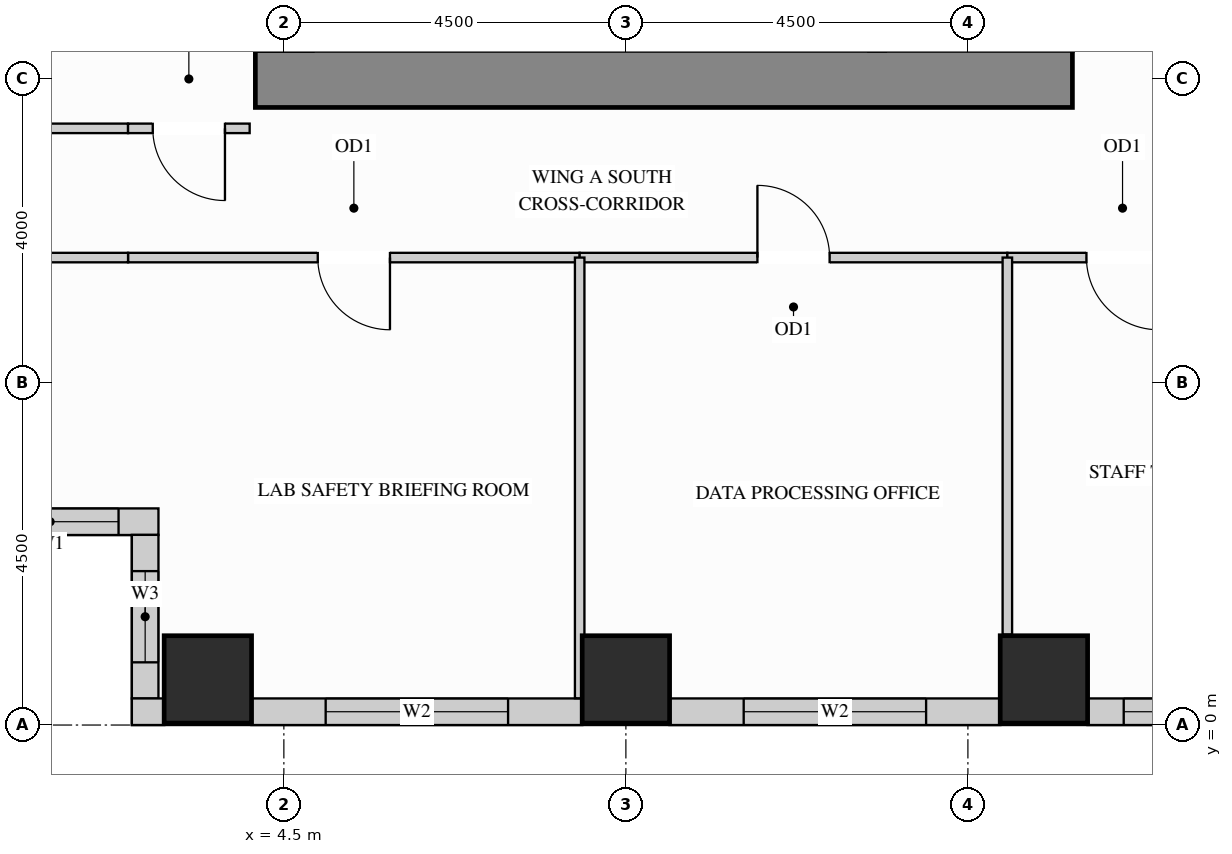
"""IFC4 building model, lengths in metres.
Left out: names, types, materials, properties, quantities, classifications, styles, units other than length and angle.
Written with IfcOpenShell. Run it as: python <this file> out.ifc"""

import sys

from ifc_helpers import new_model, si_unit, direction, frame, frame_2d, origin, origin_2d, place, context, subcontext, project, spatial, rectangle, extrude, source, transform, mapped, element, fill, save


model = new_model("IFC4")
c1 = context("Model", 3, precision=1e-05, world=origin(), true_north=direction((0.0, 1.0)))
c2 = subcontext(c1, "Body", "Model", "MODEL_VIEW")
j1 = project(units=[si_unit("LENGTHUNIT", "METRE"), si_unit("PLANEANGLEUNIT", "RADIAN")], contexts=[c1])
p1 = place(None, origin())
s1 = spatial("IfcSite", under=j1, at=p1, CompositionType="ELEMENT")
p2 = place(p1, origin())
s2 = spatial("IfcBuilding", under=s1, at=p2, CompositionType="ELEMENT")
p3 = place(p2, frame((0.0, 0.0, 120.6)))
s3 = spatial("IfcBuildingStorey", under=s2, at=p3, CompositionType="ELEMENT", Elevation=120.6)
m1 = source(origin(), c2, "Body", "SweptSolid", [
    extrude(rectangle(XDim=1.15, YDim=1.15, at=origin_2d()), origin(), (0.0, 0.0, 1.0), 3.38),
])
for number, where, z_axis, x_axis in (
    (1, (14.5, 0.6, 0.0), (0.0, 0.0, 1.0), (1.0, 0.0, 0.0)),
    (2, (3.5, 0.6, 0.0), (0.0, 0.0, 1.0), (1.0, 0.0, 0.0)),
    (3, (9.0, 0.6, 0.0), (0.0, 0.0, 1.0), (1.0, 0.0, 0.0)),
):
    element("IfcColumn", number, at=place(p3, frame(where, z_axis=z_axis, x_axis=x_axis)), inside=s3, PredefinedType="COLUMN", context=c2, shape_type="MappedRepresentation", body=[
        mapped(m1, transform((0.0, 0.0, 0.0), x_axis=(1.0, 0.0, 0.0), y_axis=(0.0, 1.0, 0.0), z_axis=(0.0, 0.0, 1.0))),
    ])
m2 = source(origin(), c2, "Body", "SweptSolid", [
    extrude(rectangle(XDim=10.75, YDim=0.75, at=frame_2d((5.375, 0.0))), origin(), (0.0, 0.0, 1.0), 3.38),
])
p4 = place(p3, frame((4.125, 8.5, 0.0), z_axis=(0.0, 0.0, 1.0), x_axis=(1.0, 0.0, 0.0)))
e4 = element("IfcWall", 4, at=p4, inside=s3, PredefinedType="SHEAR", context=c2, shape_type="MappedRepresentation", body=[
    mapped(m2, transform((0.0, 0.0, 0.0), x_axis=(1.0, 0.0, 0.0), y_axis=(0.0, 1.0, 0.0), z_axis=(0.0, 0.0, 1.0))),
])
p5 = place(p3, frame((0.0, 2.675, 0.0), z_axis=(0.0, 0.0, 1.0), x_axis=(1.0, 0.0, 0.0)))
e5 = element("IfcWall", 5, at=p5, inside=s3, PredefinedType="SOLIDWALL", context=c2, shape_type="SweptSolid", body=[
    extrude(rectangle(XDim=2.85, YDim=0.35, at=frame_2d((1.425, 0.0))), origin(), (0.0, 0.0, 1.0), 3.365),
])
p6 = place(p5, frame((0.525, 0.0, 0.78)))
e6 = element("IfcOpeningElement", 6, at=p6, cuts=e5, PredefinedType="OPENING", context=c2, shape_type="SweptSolid", body=[
    extrude(rectangle(XDim=1.8, YDim=2.1, at=frame_2d((0.9, 1.05))), frame((0.0, 0.185, 0.0), z_axis=(0.0, -1.0, 0.0), x_axis=(1.0, 0.0, 0.0)), (0.0, 0.0, 1.0), 0.37),
])
p7 = place(p3, frame((2.675, 2.502, 0.0), z_axis=(0.0, 0.0, 1.0), x_axis=(0.0, -1.0, 0.0)))
e7 = element("IfcWall", 7, at=p7, inside=s3, PredefinedType="SOLIDWALL", context=c2, shape_type="SweptSolid", body=[
    extrude(rectangle(XDim=2.154, YDim=0.35, at=frame_2d((1.077, 0.0))), origin(), (0.0, 0.0, 1.0), 3.365),
])
p8 = place(p7, frame((0.477, 0.0, 0.78)))
e8 = element("IfcOpeningElement", 8, at=p8, cuts=e7, PredefinedType="OPENING", context=c2, shape_type="SweptSolid", body=[
    extrude(rectangle(XDim=1.2, YDim=2.1, at=frame_2d((0.6, 1.05))), frame((0.0, 0.185, 0.0), z_axis=(0.0, -1.0, 0.0), x_axis=(1.0, 0.0, 0.0)), (0.0, 0.0, 1.0), 0.37),
])
m3 = source(origin(), c2, "Body", "SweptSolid", [
    extrude(rectangle(XDim=0.427, YDim=0.35, at=frame_2d((0.213, 0.0))), origin(), (0.0, 0.0, 1.0), 3.365),
])
p9 = place(p3, frame((2.5, 0.175, 0.0), z_axis=(0.0, 0.0, 1.0), x_axis=(1.0, 0.0, 0.0)))
e9 = element("IfcWall", 9, at=p9, inside=s3, PredefinedType="SOLIDWALL", context=c2, shape_type="MappedRepresentation", body=[
    mapped(m3, transform((0.0, 0.0, 0.0), x_axis=(1.0, 0.0, 0.0), y_axis=(0.0, 1.0, 0.0), z_axis=(0.0, 0.0, 1.0))),
])
p10 = place(p3, frame((4.073, 0.175, 0.0), z_axis=(0.0, 0.0, 1.0), x_axis=(1.0, 0.0, 0.0)))
e10 = element("IfcWall", 10, at=p10, inside=s3, PredefinedType="SOLIDWALL", context=c2, shape_type="SweptSolid", body=[
    extrude(rectangle(XDim=4.354, YDim=0.35, at=frame_2d((2.177, 0.0))), origin(), (0.0, 0.0, 1.0), 3.365),
])
p11 = place(p10, frame((0.977, 0.0, 0.78)))
e11 = element("IfcOpeningElement", 11, at=p11, cuts=e10, PredefinedType="OPENING", context=c2, shape_type="SweptSolid", body=[
    extrude(rectangle(XDim=2.4, YDim=2.1, at=frame_2d((1.2, 1.05))), frame((0.0, 0.185, 0.0), z_axis=(0.0, -1.0, 0.0), x_axis=(1.0, 0.0, 0.0)), (0.0, 0.0, 1.0), 0.37),
])
p12 = place(p3, frame((9.573, 0.175, 0.0), z_axis=(0.0, 0.0, 1.0), x_axis=(1.0, 0.0, 0.0)))
e12 = element("IfcWall", 12, at=p12, inside=s3, PredefinedType="SOLIDWALL", context=c2, shape_type="SweptSolid", body=[
    extrude(rectangle(XDim=4.354, YDim=0.35, at=frame_2d((2.177, 0.0))), origin(), (0.0, 0.0, 1.0), 3.365),
])
p13 = place(p12, frame((0.977, 0.0, 0.78)))
e13 = element("IfcOpeningElement", 13, at=p13, cuts=e12, PredefinedType="OPENING", context=c2, shape_type="SweptSolid", body=[
    extrude(rectangle(XDim=2.4, YDim=2.1, at=frame_2d((1.2, 1.05))), frame((0.0, 0.185, 0.0), z_axis=(0.0, -1.0, 0.0), x_axis=(1.0, 0.0, 0.0)), (0.0, 0.0, 1.0), 0.37),
])
p14 = place(p3, frame((15.073, 0.175, 0.0), z_axis=(0.0, 0.0, 1.0), x_axis=(1.0, 0.0, 0.0)))
e14 = element("IfcWall", 14, at=p14, inside=s3, PredefinedType="SOLIDWALL", context=c2, shape_type="SweptSolid", body=[
    extrude(rectangle(XDim=3.354, YDim=0.35, at=frame_2d((1.677, 0.0))), origin(), (0.0, 0.0, 1.0), 3.365),
])
p15 = place(p14, frame((0.477, 0.0, 0.78)))
e15 = element("IfcOpeningElement", 15, at=p15, cuts=e14, PredefinedType="OPENING", context=c2, shape_type="SweptSolid", body=[
    extrude(rectangle(XDim=2.4, YDim=2.1, at=frame_2d((1.2, 1.05))), frame((0.0, 0.185, 0.0), z_axis=(0.0, -1.0, 0.0), x_axis=(1.0, 0.0, 0.0)), (0.0, 0.0, 1.0), 0.37),
])
m4 = source(origin(), c2, "Body", "SweptSolid", [
    extrude(rectangle(XDim=2.098, YDim=0.125, at=frame_2d((1.049, 0.0))), origin(), (0.0, 0.0, 1.0), 3.365),
])
p16 = place(p3, frame((0.352, 7.85, 0.0), z_axis=(0.0, 0.0, 1.0), x_axis=(1.0, 0.0, 0.0)))
e16 = element("IfcWall", 16, at=p16, inside=s3, PredefinedType="PARTITIONING", context=c2, shape_type="MappedRepresentation", body=[
    mapped(m4, transform((0.0, 0.0, 0.0), x_axis=(1.0, 0.0, 0.0), y_axis=(0.0, 1.0, 0.0), z_axis=(0.0, 0.0, 1.0))),
])
p17 = place(p3, frame((2.45, 7.85, 0.0), z_axis=(0.0, 0.0, 1.0), x_axis=(1.0, 0.0, 0.0)))
e17 = element("IfcWall", 17, at=p17, inside=s3, PredefinedType="PARTITIONING", context=c2, shape_type="SweptSolid", body=[
    extrude(rectangle(XDim=1.6, YDim=0.125, at=frame_2d((0.8, 0.0))), origin(), (0.0, 0.0, 1.0), 3.365),
])
p18 = place(p17, frame((0.325, 0.0, 0.0)))
e18 = element("IfcOpeningElement", 18, at=p18, cuts=e17, PredefinedType="OPENING", context=c2, shape_type="SweptSolid", body=[
    extrude(rectangle(XDim=0.95, YDim=2.15, at=frame_2d((0.475, 1.075))), frame((0.0, 0.073, 0.0), z_axis=(0.0, -1.0, 0.0), x_axis=(1.0, 0.0, 0.0)), (0.0, 0.0, 1.0), 0.145),
])
p19 = place(p3, frame((2.45, 6.15, 0.0), z_axis=(0.0, 0.0, 1.0), x_axis=(1.0, 0.0, 0.0)))
e19 = element("IfcWall", 19, at=p19, inside=s3, PredefinedType="PARTITIONING", context=c2, shape_type="SweptSolid", body=[
    extrude(rectangle(XDim=5.942, YDim=0.125, at=frame_2d((2.971, 0.0))), origin(), (0.0, 0.0, 1.0), 3.365),
])
p20 = place(p19, frame((2.496, 0.0, 0.0)))
e20 = element("IfcOpeningElement", 20, at=p20, cuts=e19, PredefinedType="OPENING", context=c2, shape_type="SweptSolid", body=[
    extrude(rectangle(XDim=0.95, YDim=2.15, at=frame_2d((0.475, 1.075))), frame((0.0, 0.073, 0.0), z_axis=(0.0, -1.0, 0.0), x_axis=(1.0, 0.0, 0.0)), (0.0, 0.0, 1.0), 0.145),
])
p21 = place(p3, frame((8.392, 6.15, 0.0), z_axis=(0.0, 0.0, 1.0), x_axis=(1.0, 0.0, 0.0)))
e21 = element("IfcWall", 21, at=p21, inside=s3, PredefinedType="PARTITIONING", context=c2, shape_type="SweptSolid", body=[
    extrude(rectangle(XDim=5.627, YDim=0.125, at=frame_2d((2.813, 0.0))), origin(), (0.0, 0.0, 1.0), 3.365),
])
p22 = place(p21, frame((2.338, 0.0, 0.0)))
e22 = element("IfcOpeningElement", 22, at=p22, cuts=e21, PredefinedType="OPENING", context=c2, shape_type="SweptSolid", body=[
    extrude(rectangle(XDim=0.95, YDim=2.15, at=frame_2d((0.475, 1.075))), frame((0.0, 0.073, 0.0), z_axis=(0.0, -1.0, 0.0), x_axis=(1.0, 0.0, 0.0)), (0.0, 0.0, 1.0), 0.145),
])
p23 = place(p3, frame((14.019, 6.15, 0.0), z_axis=(0.0, 0.0, 1.0), x_axis=(1.0, 0.0, 0.0)))
e23 = element("IfcWall", 23, at=p23, inside=s3, PredefinedType="PARTITIONING", context=c2, shape_type="SweptSolid", body=[
    extrude(rectangle(XDim=3.031, YDim=0.125, at=frame_2d((1.516, 0.0))), origin(), (0.0, 0.0, 1.0), 3.365),
])
p24 = place(p23, frame((1.041, 0.0, 0.0)))
e24 = element("IfcOpeningElement", 24, at=p24, cuts=e23, PredefinedType="OPENING", context=c2, shape_type="SweptSolid", body=[
    extrude(rectangle(XDim=0.95, YDim=2.15, at=frame_2d((0.475, 1.075))), frame((0.0, 0.073, 0.0), z_axis=(0.0, -1.0, 0.0), x_axis=(1.0, 0.0, 0.0)), (0.0, 0.0, 1.0), 0.145),
])
p25 = place(p3, frame((0.352, 6.15, 0.0), z_axis=(0.0, 0.0, 1.0), x_axis=(1.0, 0.0, 0.0)))
e25 = element("IfcWall", 25, at=p25, inside=s3, PredefinedType="PARTITIONING", context=c2, shape_type="MappedRepresentation", body=[
    mapped(m4, transform((0.0, 0.0, 0.0), x_axis=(1.0, 0.0, 0.0), y_axis=(0.0, 1.0, 0.0), z_axis=(0.0, 0.0, 1.0))),
])
m5 = source(origin(), c2, "Body", "SweptSolid", [
    extrude(rectangle(XDim=5.798, YDim=0.125, at=frame_2d((2.899, 0.0))), origin(), (0.0, 0.0, 1.0), 3.365),
])
p26 = place(p3, frame((8.392, 0.352, 0.0), z_axis=(0.0, 0.0, 1.0), x_axis=(0.0, 1.0, 0.0)))
e26 = element("IfcWall", 26, at=p26, inside=s3, PredefinedType="PARTITIONING", context=c2, shape_type="MappedRepresentation", body=[
    mapped(m5, transform((0.0, 0.0, 0.0), x_axis=(1.0, 0.0, 0.0), y_axis=(0.0, 1.0, 0.0), z_axis=(0.0, 0.0, 1.0))),
])
m6 = source(origin(), c2, "Body", "SweptSolid", [
    extrude(rectangle(XDim=4.96, YDim=0.125, at=frame_2d((2.48, 0.0))), origin(), (0.0, 0.0, 1.0), 3.365),
])
p27 = place(p3, frame((14.019, 1.19, 0.0), z_axis=(0.0, 0.0, 1.0), x_axis=(0.0, 1.0, 0.0)))
e27 = element("IfcWall", 27, at=p27, inside=s3, PredefinedType="PARTITIONING", context=c2, shape_type="MappedRepresentation", body=[
    mapped(m6, transform((0.0, 0.0, 0.0), x_axis=(1.0, 0.0, 0.0), y_axis=(0.0, 1.0, 0.0), z_axis=(0.0, 0.0, 1.0))),
])
m7 = source(origin(), c2, "Body", "SweptSolid", [
    extrude(rectangle(XDim=0.95, YDim=2.15, at=frame_2d((0.475, 1.075))), frame((0.0, 0.025, 0.0), z_axis=(0.0, -1.0, 0.0), x_axis=(1.0, 0.0, 0.0)), (0.0, 0.0, 1.0), 0.05),
])
p28 = place(p20, origin())
e28 = element("IfcDoor", 28, at=p28, inside=s3, OperationType="SINGLE_SWING_RIGHT", PredefinedType="DOOR", context=c2, shape_type="MappedRepresentation", body=[
    mapped(m7, transform((0.0, 0.0, 0.0), x_axis=(1.0, 0.0, 0.0), y_axis=(0.0, 1.0, 0.0), z_axis=(0.0, 0.0, 1.0))),
])
fill(e20, e28)
p29 = place(p22, origin())
e29 = element("IfcDoor", 29, at=p29, inside=s3, OperationType="SINGLE_SWING_LEFT", PredefinedType="DOOR", context=c2, shape_type="MappedRepresentation", body=[
    mapped(m7, transform((0.0, 0.0, 0.0), x_axis=(1.0, 0.0, 0.0), y_axis=(0.0, 1.0, 0.0), z_axis=(0.0, 0.0, 1.0))),
])
fill(e22, e29)
p30 = place(p24, origin())
e30 = element("IfcDoor", 30, at=p30, inside=s3, OperationType="SINGLE_SWING_RIGHT", PredefinedType="DOOR", context=c2, shape_type="MappedRepresentation", body=[
    mapped(m7, transform((0.0, 0.0, 0.0), x_axis=(1.0, 0.0, 0.0), y_axis=(0.0, 1.0, 0.0), z_axis=(0.0, 0.0, 1.0))),
])
fill(e24, e30)
p31 = place(p18, origin())
e31 = element("IfcDoor", 31, at=p31, inside=s3, OperationType="SINGLE_SWING_RIGHT", PredefinedType="DOOR", context=c2, shape_type="MappedRepresentation", body=[
    mapped(m7, transform((0.0, 0.0, 0.0), x_axis=(1.0, 0.0, 0.0), y_axis=(0.0, 1.0, 0.0), z_axis=(0.0, 0.0, 1.0))),
])
fill(e18, e31)
m8 = source(origin(), c2, "Body", "SweptSolid", [
    extrude(rectangle(XDim=1.8, YDim=2.1, at=frame_2d((0.9, 1.05))), frame((0.0, 0.03, 0.0), z_axis=(0.0, -1.0, 0.0), x_axis=(1.0, 0.0, 0.0)), (0.0, 0.0, 1.0), 0.06),
])
p32 = place(p6, origin())
e32 = element("IfcWindow", 32, at=p32, inside=s3, PartitioningType="SINGLE_PANEL", PredefinedType="WINDOW", context=c2, shape_type="MappedRepresentation", body=[
    mapped(m8, transform((0.0, 0.0, 0.0), x_axis=(1.0, 0.0, 0.0), y_axis=(0.0, 1.0, 0.0), z_axis=(0.0, 0.0, 1.0))),
])
fill(e6, e32)
m9 = source(origin(), c2, "Body", "SweptSolid", [
    extrude(rectangle(XDim=2.4, YDim=2.1, at=frame_2d((1.2, 1.05))), frame((0.0, 0.03, 0.0), z_axis=(0.0, -1.0, 0.0), x_axis=(1.0, 0.0, 0.0)), (0.0, 0.0, 1.0), 0.06),
])
p33 = place(p11, origin())
e33 = element("IfcWindow", 33, at=p33, inside=s3, PartitioningType="SINGLE_PANEL", PredefinedType="WINDOW", context=c2, shape_type="MappedRepresentation", body=[
    mapped(m9, transform((0.0, 0.0, 0.0), x_axis=(1.0, 0.0, 0.0), y_axis=(0.0, 1.0, 0.0), z_axis=(0.0, 0.0, 1.0))),
])
fill(e11, e33)
p34 = place(p13, origin())
e34 = element("IfcWindow", 34, at=p34, inside=s3, PartitioningType="SINGLE_PANEL", PredefinedType="WINDOW", context=c2, shape_type="MappedRepresentation", body=[
    mapped(m9, transform((0.0, 0.0, 0.0), x_axis=(1.0, 0.0, 0.0), y_axis=(0.0, 1.0, 0.0), z_axis=(0.0, 0.0, 1.0))),
])
fill(e13, e34)
p35 = place(p15, origin())
e35 = element("IfcWindow", 35, at=p35, inside=s3, PartitioningType="SINGLE_PANEL", PredefinedType="WINDOW", context=c2, shape_type="MappedRepresentation", body=[
    mapped(m9, transform((0.0, 0.0, 0.0), x_axis=(1.0, 0.0, 0.0), y_axis=(0.0, 1.0, 0.0), z_axis=(0.0, 0.0, 1.0))),
])
fill(e15, e35)
m10 = source(origin(), c2, "Body", "SweptSolid", [
    extrude(rectangle(XDim=1.2, YDim=2.1, at=frame_2d((0.6, 1.05))), frame((0.0, 0.03, 0.0), z_axis=(0.0, -1.0, 0.0), x_axis=(1.0, 0.0, 0.0)), (0.0, 0.0, 1.0), 0.06),
])
p36 = place(p8, origin())
e36 = element("IfcWindow", 36, at=p36, inside=s3, PartitioningType="SINGLE_PANEL", PredefinedType="WINDOW", context=c2, shape_type="MappedRepresentation", body=[
    mapped(m10, transform((0.0, 0.0, 0.0), x_axis=(1.0, 0.0, 0.0), y_axis=(0.0, 1.0, 0.0), z_axis=(0.0, 0.0, 1.0))),
])
fill(e8, e36)
save(model, sys.argv[1])
